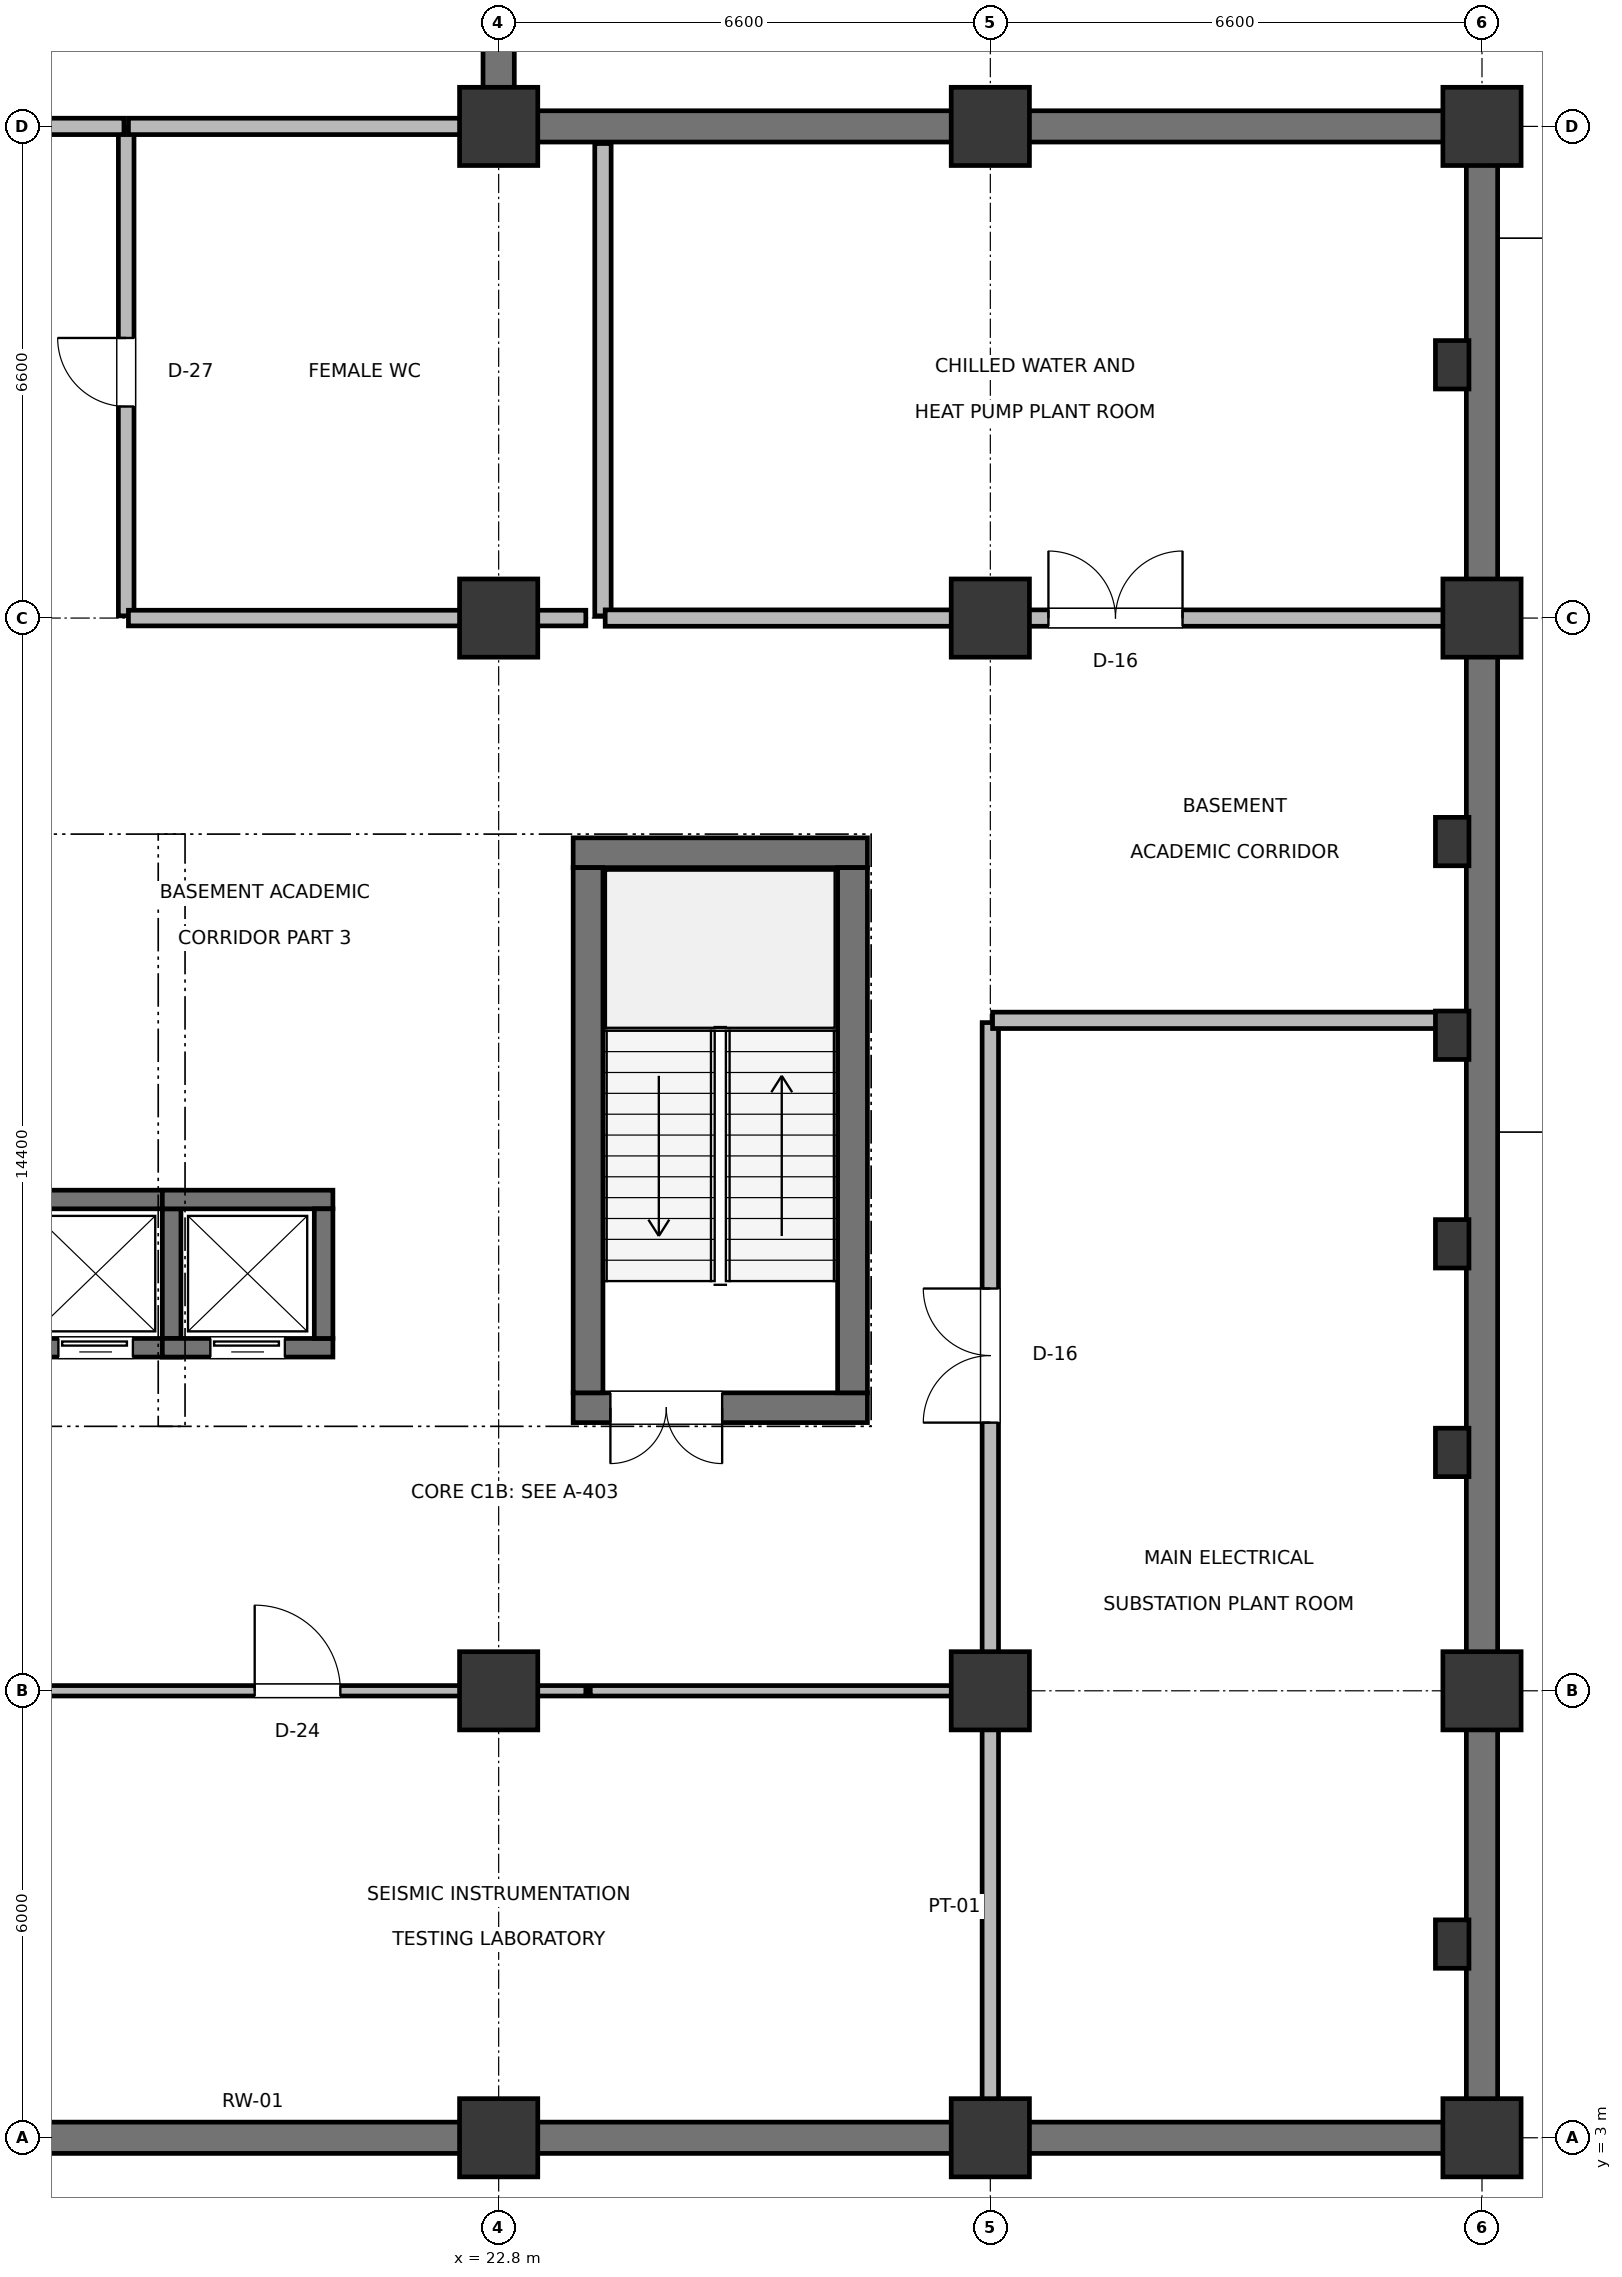
"""IFC4 building model, lengths in metres.
Left out: names, types, materials, properties, quantities, classifications, styles, units other than length and angle.
Written with IfcOpenShell. Run it as: python <this file> out.ifc"""

import sys

from ifc_helpers import new_model, si_unit, direction, frame, frame_2d, origin, origin_2d, place, context, subcontext, project, spatial, rectangle, extrude, element, fill, save


model = new_model("IFC4")
c1 = context("Model", 3, precision=1e-05, world=origin(), true_north=direction((0.0, 1.0)))
c2 = subcontext(c1, "Body", "Model", "MODEL_VIEW")
j1 = project(units=[si_unit("LENGTHUNIT", "METRE"), si_unit("PLANEANGLEUNIT", "RADIAN")], contexts=[c1])
p1 = place(None, origin())
s1 = spatial("IfcSite", under=j1, at=p1, CompositionType="ELEMENT")
p2 = place(p1, origin())
s2 = spatial("IfcBuilding", under=s1, at=p2, CompositionType="ELEMENT")
p3 = place(p2, frame((0.0, 0.0, -4.5)))
s3 = spatial("IfcBuildingStorey", under=s2, at=p3, CompositionType="ELEMENT", Elevation=-4.5)
for number, where, z_axis, x_axis in (
    (1, (22.8, 3.0, 0.0), (0.0, 0.0, 1.0), (1.0, 0.0, 0.0)),
    (2, (22.8, 9.0, 0.0), (0.0, 0.0, 1.0), (1.0, 0.0, 0.0)),
    (3, (22.8, 23.4, 0.0), (0.0, 0.0, 1.0), (1.0, 0.0, 0.0)),
    (4, (22.8, 30.0, 0.0), (0.0, 0.0, 1.0), (1.0, 0.0, 0.0)),
    (5, (29.4, 3.0, 0.0), (0.0, 0.0, 1.0), (1.0, 0.0, 0.0)),
    (6, (29.4, 9.0, 0.0), (0.0, 0.0, 1.0), (1.0, 0.0, 0.0)),
    (7, (29.4, 23.4, 0.0), (0.0, 0.0, 1.0), (1.0, 0.0, 0.0)),
    (8, (29.4, 30.0, 0.0), (0.0, 0.0, 1.0), (1.0, 0.0, 0.0)),
    (9, (36.0, 3.0, 0.0), (0.0, 0.0, 1.0), (1.0, 0.0, 0.0)),
    (10, (36.0, 9.0, 0.0), (0.0, 0.0, 1.0), (1.0, 0.0, 0.0)),
    (11, (36.0, 23.4, 0.0), (0.0, 0.0, 1.0), (1.0, 0.0, 0.0)),
    (12, (36.0, 30.0, 0.0), (0.0, 0.0, 1.0), (1.0, 0.0, 0.0)),
):
    element("IfcColumn", number, at=place(p3, frame(where, z_axis=z_axis, x_axis=x_axis)), inside=s3, PredefinedType="COLUMN", context=c2, shape_type="SweptSolid", body=[
        extrude(rectangle(XDim=1.05, YDim=1.05, at=origin_2d()), origin(), (0.0, 0.0, 1.0), 4.5),
    ])
for number, where, z_axis, x_axis in (
    (13, (35.6, 5.6, 0.0), (0.0, 0.0, 1.0), (1.0, 0.0, 0.0)),
    (14, (35.6, 12.2, 0.0), (0.0, 0.0, 1.0), (1.0, 0.0, 0.0)),
    (15, (35.6, 15.0, 0.0), (0.0, 0.0, 1.0), (1.0, 0.0, 0.0)),
    (16, (35.6, 17.8, 0.0), (0.0, 0.0, 1.0), (1.0, 0.0, 0.0)),
    (17, (35.6, 20.4, 0.0), (0.0, 0.0, 1.0), (1.0, 0.0, 0.0)),
    (18, (35.6, 26.8, 0.0), (0.0, 0.0, 1.0), (1.0, 0.0, 0.0)),
):
    element("IfcColumn", number, at=place(p3, frame(where, z_axis=z_axis, x_axis=x_axis)), inside=s3, PredefinedType="PILASTER", context=c2, shape_type="SweptSolid", body=[
        extrude(rectangle(XDim=0.45, YDim=0.65, at=origin_2d()), origin(), (0.0, 0.0, 1.0), 4.5),
    ])
p4 = place(p3, frame((2.995, 3.0, 0.0), z_axis=(0.0, 0.0, 1.0), x_axis=(1.0, 0.0, 0.0)))
e19 = element("IfcWall", 19, at=p4, inside=s3, PredefinedType="STANDARD", context=c2, shape_type="SweptSolid", body=[
    extrude(rectangle(XDim=33.01, YDim=0.42, at=frame_2d((16.505, 0.0))), origin(), (0.0, 0.0, 1.0), 3.45),
])
p5 = place(p3, frame((36.0, 2.995, 0.0), z_axis=(0.0, 0.0, 1.0), x_axis=(0.0, 1.0, 0.0)))
e20 = element("IfcWall", 20, at=p5, inside=s3, PredefinedType="STANDARD", context=c2, shape_type="SweptSolid", body=[
    extrude(rectangle(XDim=27.01, YDim=0.42, at=frame_2d((13.505, 0.0))), origin(), (0.0, 0.0, 1.0), 3.45),
])
p6 = place(p3, frame((22.795, 30.0, 0.0), z_axis=(0.0, 0.0, 1.0), x_axis=(1.0, 0.0, 0.0)))
e21 = element("IfcWall", 21, at=p6, inside=s3, PredefinedType="STANDARD", context=c2, shape_type="SweptSolid", body=[
    extrude(rectangle(XDim=13.21, YDim=0.42, at=frame_2d((6.605, 0.0))), origin(), (0.0, 0.0, 1.0), 3.45),
])
p7 = place(p3, frame((22.8, 29.995, 0.0), z_axis=(0.0, 0.0, 1.0), x_axis=(0.0, 1.0, 0.0)))
e22 = element("IfcWall", 22, at=p7, inside=s3, PredefinedType="STANDARD", context=c2, shape_type="SweptSolid", body=[
    extrude(rectangle(XDim=70.21, YDim=0.42, at=frame_2d((35.105, 0.0))), origin(), (0.0, 0.0, 1.0), 3.45),
])
p8 = place(p3, frame((16.245, 13.605, 0.0), z_axis=(0.0, 0.0, 1.0), x_axis=(1.0, 0.0, 0.0)))
e23 = element("IfcWall", 23, at=p8, inside=s3, PredefinedType="SHEAR", context=c2, shape_type="SweptSolid", body=[
    extrude(rectangle(XDim=2.29, YDim=0.25, at=frame_2d((1.145, 0.0))), origin(), (0.0, 0.0, 1.0), 4.26),
])
p9 = place(p8, frame((0.645, 0.0, 0.0)))
e24 = element("IfcOpeningElement", 24, at=p9, cuts=e23, PredefinedType="OPENING", context=c2, shape_type="SweptSolid", body=[
    extrude(rectangle(XDim=1.0, YDim=2.15, at=frame_2d((0.5, 1.075))), frame((0.0, 0.135, 0.0), z_axis=(0.0, -1.0, 0.0), x_axis=(1.0, 0.0, 0.0)), (0.0, 0.0, 1.0), 0.27),
])
p10 = place(p3, frame((16.245, 15.595, 0.0), z_axis=(0.0, 0.0, 1.0), x_axis=(1.0, 0.0, 0.0)))
e25 = element("IfcWall", 25, at=p10, inside=s3, PredefinedType="SHEAR", context=c2, shape_type="SweptSolid", body=[
    extrude(rectangle(XDim=2.29, YDim=0.25, at=frame_2d((1.145, 0.0))), origin(), (0.0, 0.0, 1.0), 4.26),
])
p11 = place(p3, frame((18.41, 13.73, 0.0), z_axis=(0.0, 0.0, 1.0), x_axis=(0.0, 1.0, 0.0)))
e26 = element("IfcWall", 26, at=p11, inside=s3, PredefinedType="SHEAR", context=c2, shape_type="SweptSolid", body=[
    extrude(rectangle(XDim=1.74, YDim=0.25, at=frame_2d((0.87, 0.0))), origin(), (0.0, 0.0, 1.0), 4.26),
])
p12 = place(p3, frame((23.8, 12.8, 0.0), z_axis=(0.0, 0.0, 1.0), x_axis=(1.0, 0.0, 0.0)))
e27 = element("IfcWall", 27, at=p12, inside=s3, PredefinedType="SHEAR", context=c2, shape_type="SweptSolid", body=[
    extrude(rectangle(XDim=3.95, YDim=0.4, at=frame_2d((1.975, 0.0))), origin(), (0.0, 0.0, 1.0), 4.28),
])
p13 = place(p12, frame((0.5, 0.0, 0.0)))
e28 = element("IfcOpeningElement", 28, at=p13, cuts=e27, PredefinedType="OPENING", context=c2, shape_type="SweptSolid", body=[
    extrude(rectangle(XDim=1.5, YDim=2.2, at=frame_2d((0.75, 1.1))), frame((0.0, 0.21, 0.0), z_axis=(0.0, -1.0, 0.0), x_axis=(1.0, 0.0, 0.0)), (0.0, 0.0, 1.0), 0.42),
])
p14 = place(p3, frame((23.8, 20.25, 0.0), z_axis=(0.0, 0.0, 1.0), x_axis=(1.0, 0.0, 0.0)))
e29 = element("IfcWall", 29, at=p14, inside=s3, PredefinedType="SHEAR", context=c2, shape_type="SweptSolid", body=[
    extrude(rectangle(XDim=3.95, YDim=0.4, at=frame_2d((1.975, 0.0))), origin(), (0.0, 0.0, 1.0), 4.28),
])
for number, where, z_axis, x_axis in (
    (30, (24.0, 13.0, 0.0), (0.0, 0.0, 1.0), (0.0, 1.0, 0.0)),
    (31, (27.55, 13.0, 0.0), (0.0, 0.0, 1.0), (0.0, 1.0, 0.0)),
):
    element("IfcWall", number, at=place(p3, frame(where, z_axis=z_axis, x_axis=x_axis)), inside=s3, PredefinedType="SHEAR", context=c2, shape_type="SweptSolid", body=[
        extrude(rectangle(XDim=7.05, YDim=0.4, at=frame_2d((3.525, 0.0))), origin(), (0.0, 0.0, 1.0), 4.28),
    ])
p15 = place(p3, frame((18.285, 13.605, 0.0), z_axis=(0.0, 0.0, 1.0), x_axis=(1.0, 0.0, 0.0)))
e32 = element("IfcWall", 32, at=p15, inside=s3, PredefinedType="SHEAR", context=c2, shape_type="SweptSolid", body=[
    extrude(rectangle(XDim=2.29, YDim=0.25, at=frame_2d((1.145, 0.0))), origin(), (0.0, 0.0, 1.0), 4.26),
])
p16 = place(p15, frame((0.645, 0.0, 0.0)))
e33 = element("IfcOpeningElement", 33, at=p16, cuts=e32, PredefinedType="OPENING", context=c2, shape_type="SweptSolid", body=[
    extrude(rectangle(XDim=1.0, YDim=2.15, at=frame_2d((0.5, 1.075))), frame((0.0, 0.135, 0.0), z_axis=(0.0, -1.0, 0.0), x_axis=(1.0, 0.0, 0.0)), (0.0, 0.0, 1.0), 0.27),
])
p17 = place(p3, frame((18.285, 15.595, 0.0), z_axis=(0.0, 0.0, 1.0), x_axis=(1.0, 0.0, 0.0)))
e34 = element("IfcWall", 34, at=p17, inside=s3, PredefinedType="SHEAR", context=c2, shape_type="SweptSolid", body=[
    extrude(rectangle(XDim=2.29, YDim=0.25, at=frame_2d((1.145, 0.0))), origin(), (0.0, 0.0, 1.0), 4.26),
])
p18 = place(p3, frame((20.45, 13.73, 0.0), z_axis=(0.0, 0.0, 1.0), x_axis=(0.0, 1.0, 0.0)))
e35 = element("IfcWall", 35, at=p18, inside=s3, PredefinedType="SHEAR", context=c2, shape_type="SweptSolid", body=[
    extrude(rectangle(XDim=1.74, YDim=0.25, at=frame_2d((0.87, 0.0))), origin(), (0.0, 0.0, 1.0), 4.26),
])
p19 = place(p3, frame((29.4, 3.23, 0.0), z_axis=(0.0, 0.0, 1.0), x_axis=(0.0, 1.0, 0.0)))
e36 = element("IfcWall", 36, at=p19, inside=s3, PredefinedType="PARTITIONING", context=c2, shape_type="SweptSolid", body=[
    extrude(rectangle(XDim=5.74, YDim=0.22, at=frame_2d((2.87, 0.0))), origin(), (0.0, 0.0, 1.0), 3.625),
])
p20 = place(p3, frame((24.03, 9.0, 0.0), z_axis=(0.0, 0.0, 1.0), x_axis=(1.0, 0.0, 0.0)))
e37 = element("IfcWall", 37, at=p20, inside=s3, PredefinedType="PARTITIONING", context=c2, shape_type="SweptSolid", body=[
    extrude(rectangle(XDim=5.34, YDim=0.14, at=frame_2d((2.67, 0.0))), origin(), (0.0, 0.0, 1.0), 3.525),
])
p21 = place(p3, frame((16.23, 9.0, 0.0), z_axis=(0.0, 0.0, 1.0), x_axis=(1.0, 0.0, 0.0)))
e38 = element("IfcWall", 38, at=p21, inside=s3, PredefinedType="PARTITIONING", context=c2, shape_type="SweptSolid", body=[
    extrude(rectangle(XDim=7.74, YDim=0.14, at=frame_2d((3.87, 0.0))), origin(), (0.0, 0.0, 1.0), 3.495),
])
p22 = place(p21, frame((3.295, 0.0, 0.0)))
e39 = element("IfcOpeningElement", 39, at=p22, cuts=e38, PredefinedType="OPENING", context=c2, shape_type="SweptSolid", body=[
    extrude(rectangle(XDim=1.15, YDim=2.15, at=frame_2d((0.575, 1.075))), frame((0.0, 0.08, 0.0), z_axis=(0.0, -1.0, 0.0), x_axis=(1.0, 0.0, 0.0)), (0.0, 0.0, 1.0), 0.16),
])
p23 = place(p3, frame((29.4, 9.03, 0.0), z_axis=(0.0, 0.0, 1.0), x_axis=(0.0, 1.0, 0.0)))
e40 = element("IfcWall", 40, at=p23, inside=s3, PredefinedType="PARTITIONING", context=c2, shape_type="SweptSolid", body=[
    extrude(rectangle(XDim=8.94, YDim=0.22, at=frame_2d((4.47, 0.0))), origin(), (0.0, 0.0, 1.0), 3.425),
])
p24 = place(p23, frame((3.57, 0.0, 0.0)))
e41 = element("IfcOpeningElement", 41, at=p24, cuts=e40, PredefinedType="OPENING", context=c2, shape_type="SweptSolid", body=[
    extrude(rectangle(XDim=1.8, YDim=2.4, at=frame_2d((0.9, 1.2))), frame((0.0, 0.12, 0.0), z_axis=(0.0, -1.0, 0.0), x_axis=(1.0, 0.0, 0.0)), (0.0, 0.0, 1.0), 0.24),
])
p25 = place(p3, frame((29.43, 18.0, 0.0), z_axis=(0.0, 0.0, 1.0), x_axis=(1.0, 0.0, 0.0)))
e42 = element("IfcWall", 42, at=p25, inside=s3, PredefinedType="PARTITIONING", context=c2, shape_type="SweptSolid", body=[
    extrude(rectangle(XDim=6.34, YDim=0.22, at=frame_2d((3.17, 0.0))), origin(), (0.0, 0.0, 1.0), 3.425),
])
p26 = place(p3, frame((24.2, 23.43, 0.0), z_axis=(0.0, 0.0, 1.0), x_axis=(0.0, 1.0, 0.0)))
e43 = element("IfcWall", 43, at=p26, inside=s3, PredefinedType="PARTITIONING", context=c2, shape_type="SweptSolid", body=[
    extrude(rectangle(XDim=6.34, YDim=0.22, at=frame_2d((3.17, 0.0))), origin(), (0.0, 0.0, 1.0), 3.495),
])
p27 = place(p3, frame((17.8, 23.43, 0.0), z_axis=(0.0, 0.0, 1.0), x_axis=(0.0, 1.0, 0.0)))
e44 = element("IfcWall", 44, at=p27, inside=s3, PredefinedType="PLUMBINGWALL", context=c2, shape_type="SweptSolid", body=[
    extrude(rectangle(XDim=6.54, YDim=0.21, at=frame_2d((3.27, 0.0))), origin(), (0.0, 0.0, 1.0), 3.425),
])
p28 = place(p27, frame((2.81, 0.0, 0.0)))
e45 = element("IfcOpeningElement", 45, at=p28, cuts=e44, PredefinedType="OPENING", context=c2, shape_type="SweptSolid", body=[
    extrude(rectangle(XDim=0.92, YDim=2.1, at=frame_2d((0.46, 1.05))), frame((0.0, 0.115, 0.0), z_axis=(0.0, -1.0, 0.0), x_axis=(1.0, 0.0, 0.0)), (0.0, 0.0, 1.0), 0.23),
])
p29 = place(p3, frame((17.83, 23.4, 0.0), z_axis=(0.0, 0.0, 1.0), x_axis=(1.0, 0.0, 0.0)))
e46 = element("IfcWall", 46, at=p29, inside=s3, PredefinedType="PLUMBINGWALL", context=c2, shape_type="SweptSolid", body=[
    extrude(rectangle(XDim=6.14, YDim=0.21, at=frame_2d((3.07, 0.0))), origin(), (0.0, 0.0, 1.0), 3.525),
])
p30 = place(p3, frame((17.83, 30.0, 0.0), z_axis=(0.0, 0.0, 1.0), x_axis=(1.0, 0.0, 0.0)))
e47 = element("IfcWall", 47, at=p30, inside=s3, PredefinedType="PARTITIONING", context=c2, shape_type="SweptSolid", body=[
    extrude(rectangle(XDim=4.74, YDim=0.22, at=frame_2d((2.37, 0.0))), origin(), (0.0, 0.0, 1.0), 3.425),
])
p31 = place(p3, frame((24.23, 23.4, 0.0), z_axis=(0.0, 0.0, 1.0), x_axis=(1.0, 0.0, 0.0)))
e48 = element("IfcWall", 48, at=p31, inside=s3, PredefinedType="PARTITIONING", context=c2, shape_type="SweptSolid", body=[
    extrude(rectangle(XDim=11.54, YDim=0.22, at=frame_2d((5.77, 0.0))), origin(), (0.0, 0.0, 1.0), 3.525),
])
p32 = place(p31, frame((5.95, 0.0, 0.0)))
e49 = element("IfcOpeningElement", 49, at=p32, cuts=e48, PredefinedType="OPENING", context=c2, shape_type="SweptSolid", body=[
    extrude(rectangle(XDim=1.8, YDim=2.4, at=frame_2d((0.9, 1.2))), frame((0.0, 0.12, 0.0), z_axis=(0.0, -1.0, 0.0), x_axis=(1.0, 0.0, 0.0)), (0.0, 0.0, 1.0), 0.24),
])
p33 = place(p3, frame((13.43, 30.0, 0.0), z_axis=(0.0, 0.0, 1.0), x_axis=(1.0, 0.0, 0.0)))
e50 = element("IfcWall", 50, at=p33, inside=s3, PredefinedType="PARTITIONING", context=c2, shape_type="SweptSolid", body=[
    extrude(rectangle(XDim=4.34, YDim=0.22, at=frame_2d((2.17, 0.0))), origin(), (0.0, 0.0, 1.0), 3.425),
])
p34 = place(p33, frame((0.925, 0.0, 0.0)))
e51 = element("IfcOpeningElement", 51, at=p34, cuts=e50, PredefinedType="OPENING", context=c2, shape_type="SweptSolid", body=[
    extrude(rectangle(XDim=1.05, YDim=2.2, at=frame_2d((0.525, 1.1))), frame((0.0, 0.12, 0.0), z_axis=(0.0, -1.0, 0.0), x_axis=(1.0, 0.0, 0.0)), (0.0, 0.0, 1.0), 0.24),
])
p35 = place(p9, frame((1.0, 0.0, 0.0), z_axis=(0.0, 0.0, 1.0), x_axis=(-1.0, 0.0, 0.0)))
e52 = element("IfcDoor", 52, at=p35, inside=s3, OperationType="SLIDING_TO_LEFT", PredefinedType="DOOR", context=c2, shape_type="SweptSolid", body=[
    extrude(rectangle(XDim=1.0, YDim=2.15, at=frame_2d((0.5, 1.075))), frame((0.0, 0.025, 0.0), z_axis=(0.0, -1.0, 0.0), x_axis=(1.0, 0.0, 0.0)), (0.0, 0.0, 1.0), 0.05),
])
fill(e24, e52)
p36 = place(p13, frame((1.5, 0.0, 0.0), z_axis=(0.0, 0.0, 1.0), x_axis=(-1.0, 0.0, 0.0)))
e53 = element("IfcDoor", 53, at=p36, inside=s3, OperationType="DOUBLE_DOOR_SINGLE_SWING", PredefinedType="DOOR", context=c2, shape_type="SweptSolid", body=[
    extrude(rectangle(XDim=1.5, YDim=2.2, at=frame_2d((0.75, 1.1))), frame((0.0, 0.025, 0.0), z_axis=(0.0, -1.0, 0.0), x_axis=(1.0, 0.0, 0.0)), (0.0, 0.0, 1.0), 0.05),
])
fill(e28, e53)
p37 = place(p16, frame((1.0, 0.0, 0.0), z_axis=(0.0, 0.0, 1.0), x_axis=(-1.0, 0.0, 0.0)))
e54 = element("IfcDoor", 54, at=p37, inside=s3, OperationType="SLIDING_TO_LEFT", PredefinedType="DOOR", context=c2, shape_type="SweptSolid", body=[
    extrude(rectangle(XDim=1.0, YDim=2.15, at=frame_2d((0.5, 1.075))), frame((0.0, 0.025, 0.0), z_axis=(0.0, -1.0, 0.0), x_axis=(1.0, 0.0, 0.0)), (0.0, 0.0, 1.0), 0.05),
])
fill(e33, e54)
p38 = place(p22, origin())
e55 = element("IfcDoor", 55, at=p38, inside=s3, OperationType="SINGLE_SWING_LEFT", PredefinedType="DOOR", context=c2, shape_type="SweptSolid", body=[
    extrude(rectangle(XDim=1.15, YDim=2.15, at=frame_2d((0.575, 1.075))), frame((0.0, 0.025, 0.0), z_axis=(0.0, -1.0, 0.0), x_axis=(1.0, 0.0, 0.0)), (0.0, 0.0, 1.0), 0.05),
])
fill(e39, e55)
p39 = place(p24, origin())
e56 = element("IfcDoor", 56, at=p39, inside=s3, OperationType="DOUBLE_DOOR_SINGLE_SWING", PredefinedType="DOOR", context=c2, shape_type="SweptSolid", body=[
    extrude(rectangle(XDim=1.8, YDim=2.4, at=frame_2d((0.9, 1.2))), frame((0.0, 0.025, 0.0), z_axis=(0.0, -1.0, 0.0), x_axis=(1.0, 0.0, 0.0)), (0.0, 0.0, 1.0), 0.05),
])
fill(e41, e56)
p40 = place(p32, origin())
e57 = element("IfcDoor", 57, at=p40, inside=s3, OperationType="DOUBLE_DOOR_SINGLE_SWING", PredefinedType="DOOR", context=c2, shape_type="SweptSolid", body=[
    extrude(rectangle(XDim=1.8, YDim=2.4, at=frame_2d((0.9, 1.2))), frame((0.0, 0.025, 0.0), z_axis=(0.0, -1.0, 0.0), x_axis=(1.0, 0.0, 0.0)), (0.0, 0.0, 1.0), 0.05),
])
fill(e49, e57)
p41 = place(p28, origin())
e58 = element("IfcDoor", 58, at=p41, inside=s3, OperationType="SINGLE_SWING_RIGHT", PredefinedType="DOOR", context=c2, shape_type="SweptSolid", body=[
    extrude(rectangle(XDim=0.92, YDim=2.1, at=frame_2d((0.46, 1.05))), frame((0.0, 0.025, 0.0), z_axis=(0.0, -1.0, 0.0), x_axis=(1.0, 0.0, 0.0)), (0.0, 0.0, 1.0), 0.05),
])
fill(e45, e58)
save(model, sys.argv[1])
